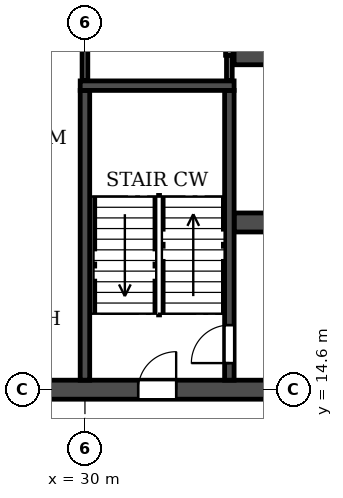
"""IFC4 building model, lengths in metres.
Left out: names, types, materials, properties, quantities, classifications, styles, units other than length and angle.
Written with IfcOpenShell. Run it as: python <this file> out.ifc"""

import sys

from ifc_helpers import new_model, si_unit, direction, frame, frame_2d, origin, place, context, subcontext, project, spatial, rectangle, extrude, element, fill, save


model = new_model("IFC4")
c1 = context("Model", 3, precision=1e-05, world=origin(), true_north=direction((0.0, 1.0)))
c2 = subcontext(c1, "Body", "Model", "MODEL_VIEW")
j1 = project(units=[si_unit("LENGTHUNIT", "METRE"), si_unit("PLANEANGLEUNIT", "RADIAN")], contexts=[c1])
p1 = place(None, origin())
s1 = spatial("IfcSite", under=j1, at=p1, CompositionType="ELEMENT")
p2 = place(p1, origin())
s2 = spatial("IfcBuilding", under=s1, at=p2, CompositionType="ELEMENT")
p3 = place(p2, frame((0.0, 0.0, 112.5)))
s3 = spatial("IfcBuildingStorey", under=s2, at=p3, CompositionType="ELEMENT", Elevation=112.5)
p4 = place(p3, frame((14.6, 14.6, 0.0), z_axis=(0.0, 0.0, 1.0), x_axis=(1.0, 0.0, 0.0)))
e1 = element("IfcWall", 1, at=p4, inside=s3, PredefinedType="SOLIDWALL", context=c2, shape_type="SweptSolid", body=[
    extrude(rectangle(XDim=72.8, YDim=0.5, at=frame_2d((36.4, 0.0))), origin(), (0.0, 0.0, 1.0), 2.95),
])
p5 = place(p4, frame((1.2, 0.0, 0.0)))
e2 = element("IfcOpeningElement", 2, at=p5, cuts=e1, PredefinedType="OPENING", context=c2, shape_type="SweptSolid", body=[
    extrude(rectangle(XDim=1.0, YDim=2.1, at=frame_2d((0.5, 1.05))), frame((0.0, 0.26, 0.0), z_axis=(0.0, -1.0, 0.0), x_axis=(1.0, 0.0, 0.0)), (0.0, 0.0, 1.0), 0.52),
])
p6 = place(p4, frame((4.3, 0.0, 0.0)))
e3 = element("IfcOpeningElement", 3, at=p6, cuts=e1, PredefinedType="OPENING", context=c2, shape_type="SweptSolid", body=[
    extrude(rectangle(XDim=1.0, YDim=2.1, at=frame_2d((0.5, 1.05))), frame((0.0, 0.26, 0.0), z_axis=(0.0, -1.0, 0.0), x_axis=(1.0, 0.0, 0.0)), (0.0, 0.0, 1.0), 0.52),
])
p7 = place(p4, frame((12.2, 0.0, 0.0)))
e4 = element("IfcOpeningElement", 4, at=p7, cuts=e1, PredefinedType="OPENING", context=c2, shape_type="SweptSolid", body=[
    extrude(rectangle(XDim=1.0, YDim=2.1, at=frame_2d((0.5, 1.05))), frame((0.0, 0.26, 0.0), z_axis=(0.0, -1.0, 0.0), x_axis=(1.0, 0.0, 0.0)), (0.0, 0.0, 1.0), 0.52),
])
p8 = place(p4, frame((16.8, 0.0, 0.0)))
e5 = element("IfcOpeningElement", 5, at=p8, cuts=e1, PredefinedType="OPENING", context=c2, shape_type="SweptSolid", body=[
    extrude(rectangle(XDim=1.0, YDim=2.1, at=frame_2d((0.5, 1.05))), frame((0.0, 0.26, 0.0), z_axis=(0.0, -1.0, 0.0), x_axis=(1.0, 0.0, 0.0)), (0.0, 0.0, 1.0), 0.52),
])
p9 = place(p4, frame((28.1, 0.0, 0.0)))
e6 = element("IfcOpeningElement", 6, at=p9, cuts=e1, PredefinedType="OPENING", context=c2, shape_type="SweptSolid", body=[
    extrude(rectangle(XDim=1.0, YDim=2.1, at=frame_2d((0.5, 1.05))), frame((0.0, 0.26, 0.0), z_axis=(0.0, -1.0, 0.0), x_axis=(1.0, 0.0, 0.0)), (0.0, 0.0, 1.0), 0.52),
])
p10 = place(p4, frame((32.0, 0.0, 0.0)))
e7 = element("IfcOpeningElement", 7, at=p10, cuts=e1, PredefinedType="OPENING", context=c2, shape_type="SweptSolid", body=[
    extrude(rectangle(XDim=1.0, YDim=2.1, at=frame_2d((0.5, 1.05))), frame((0.0, 0.26, 0.0), z_axis=(0.0, -1.0, 0.0), x_axis=(1.0, 0.0, 0.0)), (0.0, 0.0, 1.0), 0.52),
])
p11 = place(p4, frame((35.9, 0.0, 0.0)))
e8 = element("IfcOpeningElement", 8, at=p11, cuts=e1, PredefinedType="OPENING", context=c2, shape_type="SweptSolid", body=[
    extrude(rectangle(XDim=1.0, YDim=2.1, at=frame_2d((0.5, 1.05))), frame((0.0, 0.26, 0.0), z_axis=(0.0, -1.0, 0.0), x_axis=(1.0, 0.0, 0.0)), (0.0, 0.0, 1.0), 0.52),
])
p12 = place(p4, frame((39.8, 0.0, 0.0)))
e9 = element("IfcOpeningElement", 9, at=p12, cuts=e1, PredefinedType="OPENING", context=c2, shape_type="SweptSolid", body=[
    extrude(rectangle(XDim=1.0, YDim=2.1, at=frame_2d((0.5, 1.05))), frame((0.0, 0.26, 0.0), z_axis=(0.0, -1.0, 0.0), x_axis=(1.0, 0.0, 0.0)), (0.0, 0.0, 1.0), 0.52),
])
p13 = place(p4, frame((43.7, 0.0, 0.0)))
e10 = element("IfcOpeningElement", 10, at=p13, cuts=e1, PredefinedType="OPENING", context=c2, shape_type="SweptSolid", body=[
    extrude(rectangle(XDim=1.0, YDim=2.1, at=frame_2d((0.5, 1.05))), frame((0.0, 0.26, 0.0), z_axis=(0.0, -1.0, 0.0), x_axis=(1.0, 0.0, 0.0)), (0.0, 0.0, 1.0), 0.52),
])
p14 = place(p4, frame((55.0, 0.0, 0.0)))
e11 = element("IfcOpeningElement", 11, at=p14, cuts=e1, PredefinedType="OPENING", context=c2, shape_type="SweptSolid", body=[
    extrude(rectangle(XDim=1.0, YDim=2.1, at=frame_2d((0.5, 1.05))), frame((0.0, 0.26, 0.0), z_axis=(0.0, -1.0, 0.0), x_axis=(1.0, 0.0, 0.0)), (0.0, 0.0, 1.0), 0.52),
])
p15 = place(p4, frame((59.6, 0.0, 0.0)))
e12 = element("IfcOpeningElement", 12, at=p15, cuts=e1, PredefinedType="OPENING", context=c2, shape_type="SweptSolid", body=[
    extrude(rectangle(XDim=1.0, YDim=2.1, at=frame_2d((0.5, 1.05))), frame((0.0, 0.26, 0.0), z_axis=(0.0, -1.0, 0.0), x_axis=(1.0, 0.0, 0.0)), (0.0, 0.0, 1.0), 0.52),
])
p16 = place(p4, frame((67.5, 0.0, 0.0)))
e13 = element("IfcOpeningElement", 13, at=p16, cuts=e1, PredefinedType="OPENING", context=c2, shape_type="SweptSolid", body=[
    extrude(rectangle(XDim=1.0, YDim=2.1, at=frame_2d((0.5, 1.05))), frame((0.0, 0.26, 0.0), z_axis=(0.0, -1.0, 0.0), x_axis=(1.0, 0.0, 0.0)), (0.0, 0.0, 1.0), 0.52),
])
p17 = place(p4, frame((70.35, 0.0, 0.0)))
e14 = element("IfcOpeningElement", 14, at=p17, cuts=e1, PredefinedType="OPENING", context=c2, shape_type="SweptSolid", body=[
    extrude(rectangle(XDim=1.5, YDim=2.1, at=frame_2d((0.75, 1.05))), frame((0.0, 0.26, 0.0), z_axis=(0.0, -1.0, 0.0), x_axis=(1.0, 0.0, 0.0)), (0.0, 0.0, 1.0), 0.52),
])
p18 = place(p3, frame((33.925, 19.0, 0.0), z_axis=(0.0, 0.0, 1.0), x_axis=(1.0, 0.0, 0.0)))
e15 = element("IfcWall", 15, at=p18, inside=s3, PredefinedType="SOLIDWALL", context=c2, shape_type="SweptSolid", body=[
    extrude(rectangle(XDim=34.15, YDim=0.5, at=frame_2d((17.075, 0.0))), origin(), (0.0, 0.0, 1.0), 2.95),
])
p19 = place(p18, frame((16.175, 0.0, 0.0)))
e16 = element("IfcOpeningElement", 16, at=p19, cuts=e15, PredefinedType="OPENING", context=c2, shape_type="SweptSolid", body=[
    extrude(rectangle(XDim=1.8, YDim=2.1, at=frame_2d((0.9, 1.05))), frame((0.0, 0.26, 0.0), z_axis=(0.0, -1.0, 0.0), x_axis=(1.0, 0.0, 0.0)), (0.0, 0.0, 1.0), 0.52),
])
p20 = place(p18, frame((1.525, 0.0, 0.0)))
e17 = element("IfcOpeningElement", 17, at=p20, cuts=e15, PredefinedType="OPENING", context=c2, shape_type="SweptSolid", body=[
    extrude(rectangle(XDim=1.8, YDim=2.1, at=frame_2d((0.9, 1.05))), frame((0.0, 0.26, 0.0), z_axis=(0.0, -1.0, 0.0), x_axis=(1.0, 0.0, 0.0)), (0.0, 0.0, 1.0), 0.52),
])
p21 = place(p18, frame((8.725, 0.0, 0.0)))
e18 = element("IfcOpeningElement", 18, at=p21, cuts=e15, PredefinedType="OPENING", context=c2, shape_type="SweptSolid", body=[
    extrude(rectangle(XDim=1.1, YDim=2.1, at=frame_2d((0.55, 1.05))), frame((0.0, 0.26, 0.0), z_axis=(0.0, -1.0, 0.0), x_axis=(1.0, 0.0, 0.0)), (0.0, 0.0, 1.0), 0.52),
])
p22 = place(p18, frame((11.325, 0.0, 0.0)))
e19 = element("IfcOpeningElement", 19, at=p22, cuts=e15, PredefinedType="OPENING", context=c2, shape_type="SweptSolid", body=[
    extrude(rectangle(XDim=1.1, YDim=2.1, at=frame_2d((0.55, 1.05))), frame((0.0, 0.26, 0.0), z_axis=(0.0, -1.0, 0.0), x_axis=(1.0, 0.0, 0.0)), (0.0, 0.0, 1.0), 0.52),
])
p23 = place(p18, frame((13.925, 0.0, 0.0)))
e20 = element("IfcOpeningElement", 20, at=p23, cuts=e15, PredefinedType="OPENING", context=c2, shape_type="SweptSolid", body=[
    extrude(rectangle(XDim=1.1, YDim=2.1, at=frame_2d((0.55, 1.05))), frame((0.0, 0.26, 0.0), z_axis=(0.0, -1.0, 0.0), x_axis=(1.0, 0.0, 0.0)), (0.0, 0.0, 1.0), 0.52),
])
p24 = place(p18, frame((19.125, 0.0, 0.0)))
e21 = element("IfcOpeningElement", 21, at=p24, cuts=e15, PredefinedType="OPENING", context=c2, shape_type="SweptSolid", body=[
    extrude(rectangle(XDim=1.1, YDim=2.1, at=frame_2d((0.55, 1.05))), frame((0.0, 0.26, 0.0), z_axis=(0.0, -1.0, 0.0), x_axis=(1.0, 0.0, 0.0)), (0.0, 0.0, 1.0), 0.52),
])
p25 = place(p18, frame((21.725, 0.0, 0.0)))
e22 = element("IfcOpeningElement", 22, at=p25, cuts=e15, PredefinedType="OPENING", context=c2, shape_type="SweptSolid", body=[
    extrude(rectangle(XDim=1.1, YDim=2.1, at=frame_2d((0.55, 1.05))), frame((0.0, 0.26, 0.0), z_axis=(0.0, -1.0, 0.0), x_axis=(1.0, 0.0, 0.0)), (0.0, 0.0, 1.0), 0.52),
])
p26 = place(p18, frame((24.325, 0.0, 0.0)))
e23 = element("IfcOpeningElement", 23, at=p26, cuts=e15, PredefinedType="OPENING", context=c2, shape_type="SweptSolid", body=[
    extrude(rectangle(XDim=1.1, YDim=2.1, at=frame_2d((0.55, 1.05))), frame((0.0, 0.26, 0.0), z_axis=(0.0, -1.0, 0.0), x_axis=(1.0, 0.0, 0.0)), (0.0, 0.0, 1.0), 0.52),
])
p27 = place(p18, frame((30.825, 0.0, 0.0)))
e24 = element("IfcOpeningElement", 24, at=p27, cuts=e15, PredefinedType="OPENING", context=c2, shape_type="SweptSolid", body=[
    extrude(rectangle(XDim=1.8, YDim=2.1, at=frame_2d((0.9, 1.05))), frame((0.0, 0.26, 0.0), z_axis=(0.0, -1.0, 0.0), x_axis=(1.0, 0.0, 0.0)), (0.0, 0.0, 1.0), 0.52),
])
p28 = place(p3, frame((33.925, 23.4, 0.0), z_axis=(0.0, 0.0, 1.0), x_axis=(1.0, 0.0, 0.0)))
e25 = element("IfcWall", 25, at=p28, inside=s3, PredefinedType="SOLIDWALL", context=c2, shape_type="SweptSolid", body=[
    extrude(rectangle(XDim=34.15, YDim=0.5, at=frame_2d((17.075, 0.0))), origin(), (0.0, 0.0, 1.0), 2.95),
])
p29 = place(p28, frame((16.175, 0.0, 0.0)))
e26 = element("IfcOpeningElement", 26, at=p29, cuts=e25, PredefinedType="OPENING", context=c2, shape_type="SweptSolid", body=[
    extrude(rectangle(XDim=1.8, YDim=2.1, at=frame_2d((0.9, 1.05))), frame((0.0, 0.26, 0.0), z_axis=(0.0, -1.0, 0.0), x_axis=(1.0, 0.0, 0.0)), (0.0, 0.0, 1.0), 0.52),
])
p30 = place(p28, frame((11.025, 0.0, 0.0)))
e27 = element("IfcOpeningElement", 27, at=p30, cuts=e25, PredefinedType="OPENING", context=c2, shape_type="SweptSolid", body=[
    extrude(rectangle(XDim=1.1, YDim=2.1, at=frame_2d((0.55, 1.05))), frame((0.0, 0.26, 0.0), z_axis=(0.0, -1.0, 0.0), x_axis=(1.0, 0.0, 0.0)), (0.0, 0.0, 1.0), 0.52),
])
p31 = place(p3, frame((30.0, 14.85, 0.0), z_axis=(0.0, 0.0, 1.0), x_axis=(0.0, 1.0, 0.0)))
e28 = element("IfcWall", 28, at=p31, inside=s3, PredefinedType="SOLIDWALL", context=c2, shape_type="SweptSolid", body=[
    extrude(rectangle(XDim=7.625, YDim=0.25, at=frame_2d((3.812, 0.0))), origin(), (0.0, 0.0, 1.0), 2.95),
])
p32 = place(p3, frame((33.8, 14.85, 0.0), z_axis=(0.0, 0.0, 1.0), x_axis=(0.0, 1.0, 0.0)))
e29 = element("IfcWall", 29, at=p32, inside=s3, PredefinedType="SOLIDWALL", context=c2, shape_type="SweptSolid", body=[
    extrude(rectangle(XDim=7.625, YDim=0.25, at=frame_2d((3.812, 0.0))), origin(), (0.0, 0.0, 1.0), 2.95),
])
p33 = place(p32, frame((0.45, 0.0, 0.0)))
e30 = element("IfcOpeningElement", 30, at=p33, cuts=e29, PredefinedType="OPENING", context=c2, shape_type="SweptSolid", body=[
    extrude(rectangle(XDim=1.0, YDim=2.1, at=frame_2d((0.5, 1.05))), frame((0.0, 0.135, 0.0), z_axis=(0.0, -1.0, 0.0), x_axis=(1.0, 0.0, 0.0)), (0.0, 0.0, 1.0), 0.27),
])
p34 = place(p3, frame((29.875, 22.6, 0.0), z_axis=(0.0, 0.0, 1.0), x_axis=(1.0, 0.0, 0.0)))
e31 = element("IfcWall", 31, at=p34, inside=s3, PredefinedType="SOLIDWALL", context=c2, shape_type="SweptSolid", body=[
    extrude(rectangle(XDim=4.05, YDim=0.25, at=frame_2d((2.025, 0.0))), origin(), (0.0, 0.0, 1.0), 2.95),
])
p35 = place(p3, frame((30.0, 22.735, 0.0), z_axis=(0.0, 0.0, 1.0), x_axis=(0.0, 1.0, 0.0)))
e32 = element("IfcWall", 32, at=p35, inside=s3, PredefinedType="PARTITIONING", context=c2, shape_type="SweptSolid", body=[
    extrude(rectangle(XDim=4.805, YDim=0.15, at=frame_2d((2.402, 0.0))), origin(), (0.0, 0.0, 1.0), 2.95),
])
p36 = place(p3, frame((33.8, 22.735, 0.0), z_axis=(0.0, 0.0, 1.0), x_axis=(0.0, 1.0, 0.0)))
e33 = element("IfcWall", 33, at=p36, inside=s3, PredefinedType="PARTITIONING", context=c2, shape_type="SweptSolid", body=[
    extrude(rectangle(XDim=0.665, YDim=0.15, at=frame_2d((0.333, 0.0))), origin(), (0.0, 0.0, 1.0), 2.95),
])
p37 = place(p3, frame((33.8, 23.4, 0.0), z_axis=(0.0, 0.0, 1.0), x_axis=(0.0, 1.0, 0.0)))
e34 = element("IfcWall", 34, at=p37, inside=s3, PredefinedType="PARTITIONING", context=c2, shape_type="SweptSolid", body=[
    extrude(rectangle(XDim=2.7, YDim=0.2, at=frame_2d((1.35, 0.0))), origin(), (0.0, 0.0, 1.0), 2.95),
])
p38 = place(p8, origin())
e35 = element("IfcDoor", 35, at=p38, inside=s3, OperationType="SINGLE_SWING_RIGHT", PredefinedType="DOOR", context=c2, shape_type="SweptSolid", body=[
    extrude(rectangle(XDim=1.0, YDim=2.1, at=frame_2d((0.5, 1.05))), frame((0.0, 0.025, 0.0), z_axis=(0.0, -1.0, 0.0), x_axis=(1.0, 0.0, 0.0)), (0.0, 0.0, 1.0), 0.05),
])
fill(e5, e35)
p39 = place(p33, origin())
e36 = element("IfcDoor", 36, at=p39, inside=s3, OperationType="SINGLE_SWING_LEFT", PredefinedType="DOOR", context=c2, shape_type="SweptSolid", body=[
    extrude(rectangle(XDim=1.0, YDim=2.1, at=frame_2d((0.5, 1.05))), frame((0.0, 0.025, 0.0), z_axis=(0.0, -1.0, 0.0), x_axis=(1.0, 0.0, 0.0)), (0.0, 0.0, 1.0), 0.05),
])
fill(e30, e36)
save(model, sys.argv[1])
